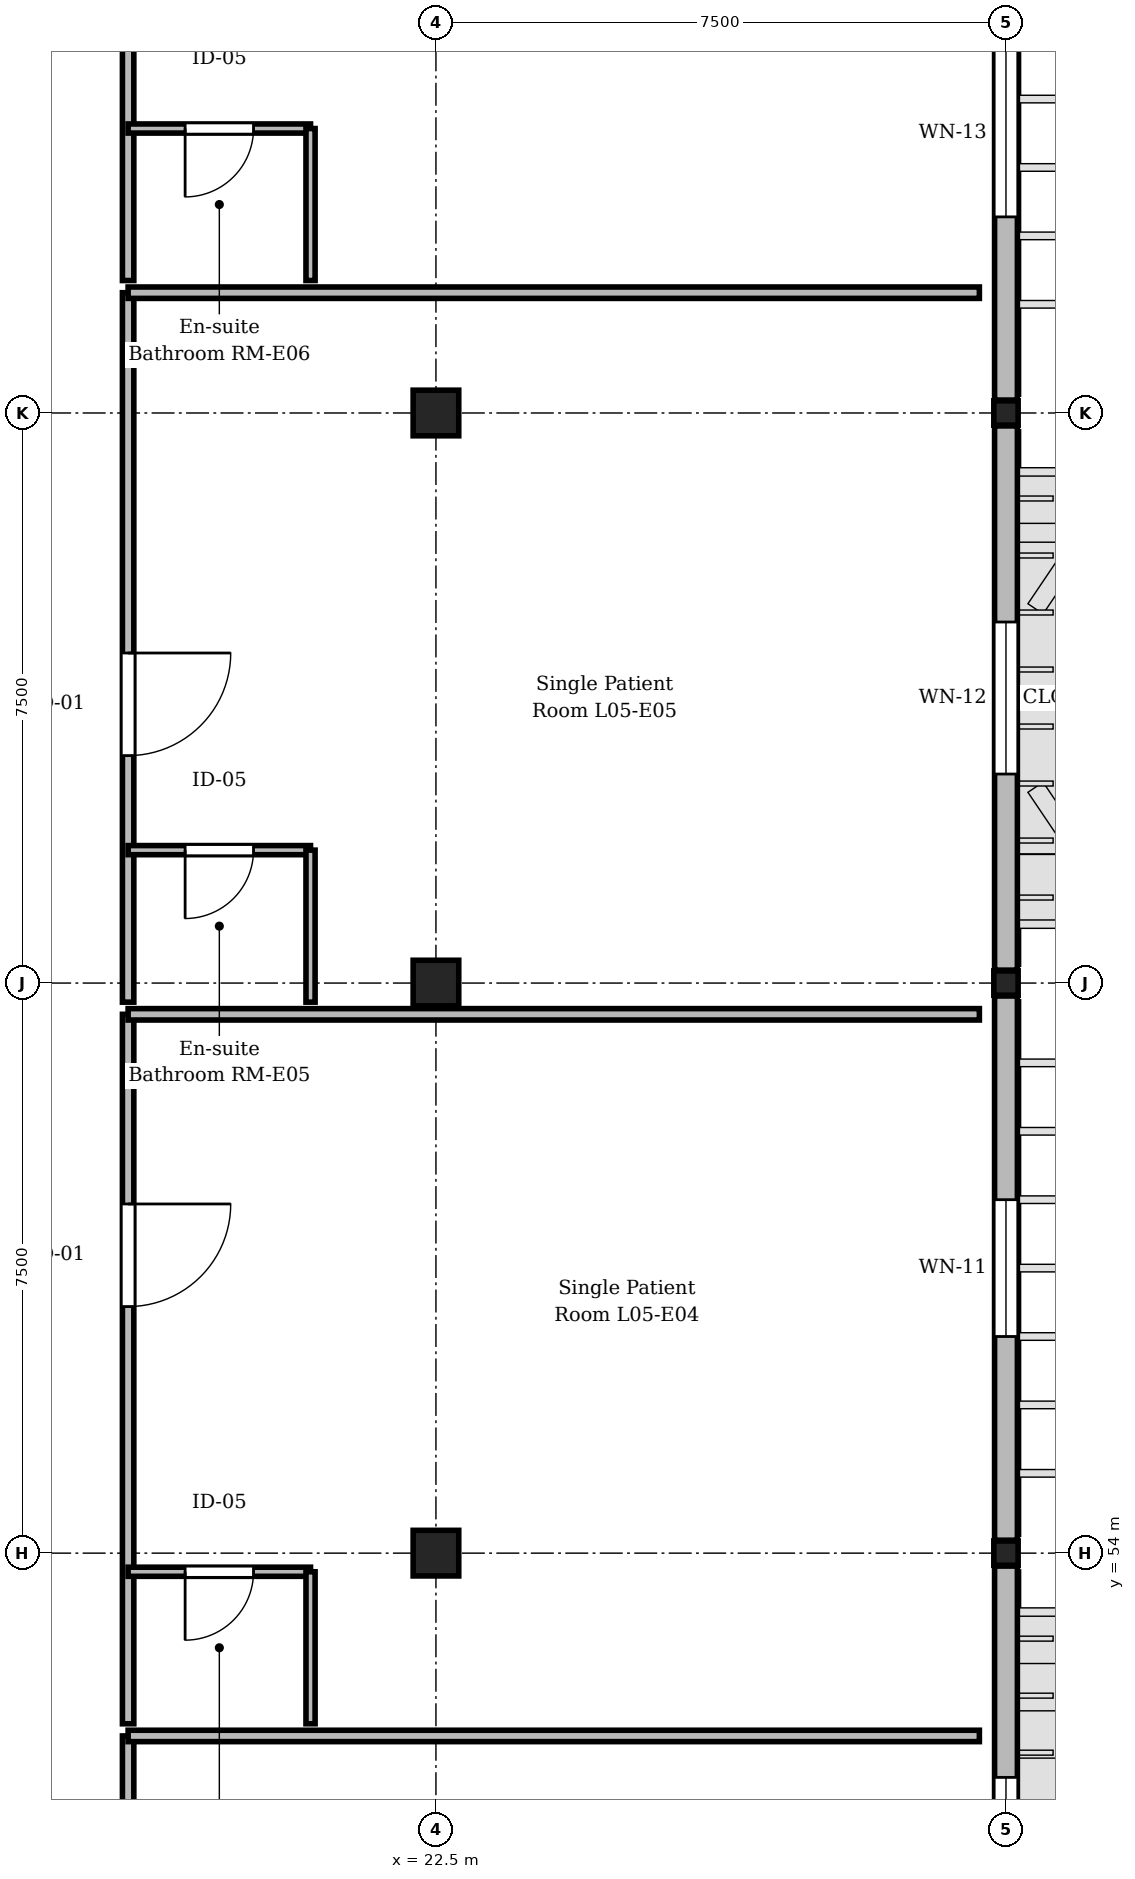
"""IFC4 building model, lengths in metres.
Left out: names, types, materials, properties, quantities, classifications, styles, units other than length and angle.
Written with IfcOpenShell. Run it as: python <this file> out.ifc"""

import sys

from ifc_helpers import new_model, si_unit, direction, frame, frame_2d, origin, origin_2d, place, context, subcontext, project, spatial, rectangle, circle, extrude, element, fill, save


model = new_model("IFC4")
c1 = context("Model", 3, precision=1e-05, world=origin(), true_north=direction((0.0, 1.0)))
c2 = subcontext(c1, "Body", "Model", "MODEL_VIEW")
j1 = project(units=[si_unit("LENGTHUNIT", "METRE"), si_unit("PLANEANGLEUNIT", "RADIAN")], contexts=[c1])
p1 = place(None, origin())
s1 = spatial("IfcSite", under=j1, at=p1, CompositionType="ELEMENT")
p2 = place(p1, origin())
s2 = spatial("IfcBuilding", under=s1, at=p2, CompositionType="ELEMENT")
p3 = place(p2, frame((0.0, 0.0, 21.9)))
s3 = spatial("IfcBuildingStorey", under=s2, at=p3, CompositionType="ELEMENT", Elevation=21.9)
for number, where, z_axis, x_axis in (
    (1, (22.5, 54.0, 0.0), (0.0, 0.0, 1.0), (1.0, 0.0, 0.0)),
    (2, (22.5, 61.5, 0.0), (0.0, 0.0, 1.0), (1.0, 0.0, 0.0)),
):
    element("IfcColumn", number, at=place(p3, frame(where, z_axis=z_axis, x_axis=x_axis)), inside=s3, PredefinedType="COLUMN", context=c2, shape_type="SweptSolid", body=[
        extrude(rectangle(XDim=0.6, YDim=0.6, at=origin_2d()), origin(), (0.0, 0.0, 1.0), 4.05),
    ])
p4 = place(p3, frame((22.5, 69.0, 0.0), z_axis=(0.0, 0.0, 1.0), x_axis=(1.0, 0.0, 0.0)))
e3 = element("IfcColumn", 3, at=p4, inside=s3, PredefinedType="COLUMN", context=c2, shape_type="SweptSolid", body=[
    extrude(circle(Radius=0.3, at=origin_2d()), origin(), (0.0, 0.0, 1.0), 4.05),
])
for number, where, z_axis, x_axis in (
    (4, (30.0, 54.0, 0.0), (0.0, 0.0, 1.0), (1.0, 0.0, 0.0)),
    (5, (30.0, 61.5, 0.0), (0.0, 0.0, 1.0), (1.0, 0.0, 0.0)),
    (6, (30.0, 69.0, 0.0), (0.0, 0.0, 1.0), (1.0, 0.0, 0.0)),
):
    element("IfcColumn", number, at=place(p3, frame(where, z_axis=z_axis, x_axis=x_axis)), inside=s3, PredefinedType="COLUMN", context=c2, shape_type="SweptSolid", body=[
        extrude(rectangle(XDim=0.32, YDim=0.32, at=origin_2d()), origin(), (0.0, 0.0, 1.0), 4.05),
    ])
p5 = place(p3, frame((30.0, 53.83, 0.0), z_axis=(0.0, 0.0, 1.0), x_axis=(0.0, -1.0, 0.0)))
e7 = element("IfcWall", 7, at=p5, inside=s3, PredefinedType="STANDARD", context=c2, shape_type="SweptSolid", body=[
    extrude(rectangle(XDim=7.16, YDim=0.3, at=frame_2d((3.58, 0.0))), origin(), (0.0, 0.0, 1.0), 3.17),
])
p6 = place(p5, frame((2.78, 0.0, 0.9)))
e8 = element("IfcOpeningElement", 8, at=p6, cuts=e7, PredefinedType="OPENING", context=c2, shape_type="SweptSolid", body=[
    extrude(rectangle(XDim=1.6, YDim=1.95, at=frame_2d((0.8, 0.975))), frame((0.0, 0.16, 0.0), z_axis=(0.0, -1.0, 0.0), x_axis=(1.0, 0.0, 0.0)), (0.0, 0.0, 1.0), 0.32),
])
p7 = place(p3, frame((30.0, 61.33, 0.0), z_axis=(0.0, 0.0, 1.0), x_axis=(0.0, -1.0, 0.0)))
e9 = element("IfcWall", 9, at=p7, inside=s3, PredefinedType="STANDARD", context=c2, shape_type="SweptSolid", body=[
    extrude(rectangle(XDim=7.16, YDim=0.3, at=frame_2d((3.58, 0.0))), origin(), (0.0, 0.0, 1.0), 3.17),
])
p8 = place(p7, frame((2.68, 0.0, 0.9)))
e10 = element("IfcOpeningElement", 10, at=p8, cuts=e9, PredefinedType="OPENING", context=c2, shape_type="SweptSolid", body=[
    extrude(rectangle(XDim=1.8, YDim=1.95, at=frame_2d((0.9, 0.975))), frame((0.0, 0.16, 0.0), z_axis=(0.0, -1.0, 0.0), x_axis=(1.0, 0.0, 0.0)), (0.0, 0.0, 1.0), 0.32),
])
p9 = place(p3, frame((30.0, 68.83, 0.0), z_axis=(0.0, 0.0, 1.0), x_axis=(0.0, -1.0, 0.0)))
e11 = element("IfcWall", 11, at=p9, inside=s3, PredefinedType="STANDARD", context=c2, shape_type="SweptSolid", body=[
    extrude(rectangle(XDim=7.16, YDim=0.3, at=frame_2d((3.58, 0.0))), origin(), (0.0, 0.0, 1.0), 3.17),
])
p10 = place(p9, frame((2.58, 0.0, 0.9)))
e12 = element("IfcOpeningElement", 12, at=p10, cuts=e11, PredefinedType="OPENING", context=c2, shape_type="SweptSolid", body=[
    extrude(rectangle(XDim=2.0, YDim=1.95, at=frame_2d((1.0, 0.975))), frame((0.0, 0.16, 0.0), z_axis=(0.0, -1.0, 0.0), x_axis=(1.0, 0.0, 0.0)), (0.0, 0.0, 1.0), 0.32),
])
p11 = place(p3, frame((30.0, 76.19, 0.0), z_axis=(0.0, 0.0, 1.0), x_axis=(0.0, -1.0, 0.0)))
e13 = element("IfcWall", 13, at=p11, inside=s3, PredefinedType="STANDARD", context=c2, shape_type="SweptSolid", body=[
    extrude(rectangle(XDim=7.02, YDim=0.3, at=frame_2d((3.51, 0.0))), origin(), (0.0, 0.0, 1.0), 3.17),
])
p12 = place(p11, frame((2.41, 0.0, 0.9)))
e14 = element("IfcOpeningElement", 14, at=p12, cuts=e13, PredefinedType="OPENING", context=c2, shape_type="SweptSolid", body=[
    extrude(rectangle(XDim=2.2, YDim=1.95, at=frame_2d((1.1, 0.975))), frame((0.0, 0.16, 0.0), z_axis=(0.0, -1.0, 0.0), x_axis=(1.0, 0.0, 0.0)), (0.0, 0.0, 1.0), 0.32),
])
p13 = place(p3, frame((18.45, 51.595, 0.0), z_axis=(0.0, 0.0, 1.0), x_axis=(0.0, -1.0, 0.0)))
e15 = element("IfcWall", 15, at=p13, inside=s3, PredefinedType="PARTITIONING", context=c2, shape_type="SweptSolid", body=[
    extrude(rectangle(XDim=9.334, YDim=0.15, at=frame_2d((4.667, 0.0))), origin(), (0.0, 0.0, 1.0), 3.755),
])
p14 = place(p13, frame((0.998, 0.0, 0.0)))
e16 = element("IfcOpeningElement", 16, at=p14, cuts=e15, PredefinedType="OPENING", context=c2, shape_type="SweptSolid", body=[
    extrude(rectangle(XDim=1.35, YDim=2.25, at=frame_2d((0.675, 1.125))), frame((0.0, 0.085, 0.0), z_axis=(0.0, -1.0, 0.0), x_axis=(1.0, 0.0, 0.0)), (0.0, 0.0, 1.0), 0.17),
])
p15 = place(p3, frame((18.45, 61.089, 0.0), z_axis=(0.0, 0.0, 1.0), x_axis=(0.0, -1.0, 0.0)))
e17 = element("IfcWall", 17, at=p15, inside=s3, PredefinedType="PARTITIONING", context=c2, shape_type="SweptSolid", body=[
    extrude(rectangle(XDim=9.334, YDim=0.15, at=frame_2d((4.667, 0.0))), origin(), (0.0, 0.0, 1.0), 3.755),
])
p16 = place(p15, frame((2.495, 0.0, 0.0)))
e18 = element("IfcOpeningElement", 18, at=p16, cuts=e17, PredefinedType="OPENING", context=c2, shape_type="SweptSolid", body=[
    extrude(rectangle(XDim=1.35, YDim=2.25, at=frame_2d((0.675, 1.125))), frame((0.0, 0.085, 0.0), z_axis=(0.0, -1.0, 0.0), x_axis=(1.0, 0.0, 0.0)), (0.0, 0.0, 1.0), 0.17),
])
p17 = place(p3, frame((20.85, 53.755, 0.0), z_axis=(0.0, 0.0, 1.0), x_axis=(-1.0, 0.0, 0.0)))
e19 = element("IfcWall", 19, at=p17, inside=s3, PredefinedType="PARTITIONING", context=c2, shape_type="SweptSolid", body=[
    extrude(rectangle(XDim=2.4, YDim=0.12, at=frame_2d((1.2, 0.0))), origin(), (0.0, 0.0, 1.0), 3.205),
])
p18 = place(p17, frame((0.75, 0.0, 0.0)))
e20 = element("IfcOpeningElement", 20, at=p18, cuts=e19, PredefinedType="OPENING", context=c2, shape_type="SweptSolid", body=[
    extrude(rectangle(XDim=0.9, YDim=2.1, at=frame_2d((0.45, 1.05))), frame((0.0, 0.07, 0.0), z_axis=(0.0, -1.0, 0.0), x_axis=(1.0, 0.0, 0.0)), (0.0, 0.0, 1.0), 0.14),
])
p19 = place(p3, frame((20.85, 51.755, 0.0), z_axis=(0.0, 0.0, 1.0), x_axis=(0.0, 1.0, 0.0)))
e21 = element("IfcWall", 21, at=p19, inside=s3, PredefinedType="PARTITIONING", context=c2, shape_type="SweptSolid", body=[
    extrude(rectangle(XDim=2.0, YDim=0.12, at=frame_2d((1.0, 0.0))), origin(), (0.0, 0.0, 1.0), 3.755),
])
p20 = place(p3, frame((18.45, 70.583, 0.0), z_axis=(0.0, 0.0, 1.0), x_axis=(0.0, -1.0, 0.0)))
e22 = element("IfcWall", 22, at=p20, inside=s3, PredefinedType="PARTITIONING", context=c2, shape_type="SweptSolid", body=[
    extrude(rectangle(XDim=9.334, YDim=0.15, at=frame_2d((4.667, 0.0))), origin(), (0.0, 0.0, 1.0), 3.755),
])
p21 = place(p20, frame((4.74, 0.0, 0.0)))
e23 = element("IfcOpeningElement", 23, at=p21, cuts=e22, PredefinedType="OPENING", context=c2, shape_type="SweptSolid", body=[
    extrude(rectangle(XDim=1.35, YDim=2.25, at=frame_2d((0.675, 1.125))), frame((0.0, 0.085, 0.0), z_axis=(0.0, -1.0, 0.0), x_axis=(1.0, 0.0, 0.0)), (0.0, 0.0, 1.0), 0.17),
])
p22 = place(p3, frame((20.85, 63.249, 0.0), z_axis=(0.0, 0.0, 1.0), x_axis=(-1.0, 0.0, 0.0)))
e24 = element("IfcWall", 24, at=p22, inside=s3, PredefinedType="PARTITIONING", context=c2, shape_type="SweptSolid", body=[
    extrude(rectangle(XDim=2.4, YDim=0.12, at=frame_2d((1.2, 0.0))), origin(), (0.0, 0.0, 1.0), 3.755),
])
p23 = place(p22, frame((0.75, 0.0, 0.0)))
e25 = element("IfcOpeningElement", 25, at=p23, cuts=e24, PredefinedType="OPENING", context=c2, shape_type="SweptSolid", body=[
    extrude(rectangle(XDim=0.9, YDim=2.1, at=frame_2d((0.45, 1.05))), frame((0.0, 0.07, 0.0), z_axis=(0.0, -1.0, 0.0), x_axis=(1.0, 0.0, 0.0)), (0.0, 0.0, 1.0), 0.14),
])
p24 = place(p3, frame((20.85, 61.249, 0.0), z_axis=(0.0, 0.0, 1.0), x_axis=(0.0, 1.0, 0.0)))
e26 = element("IfcWall", 26, at=p24, inside=s3, PredefinedType="PARTITIONING", context=c2, shape_type="SweptSolid", body=[
    extrude(rectangle(XDim=2.0, YDim=0.12, at=frame_2d((1.0, 0.0))), origin(), (0.0, 0.0, 1.0), 3.755),
])
p25 = place(p3, frame((18.45, 80.076, 0.0), z_axis=(0.0, 0.0, 1.0), x_axis=(0.0, -1.0, 0.0)))
e27 = element("IfcWall", 27, at=p25, inside=s3, PredefinedType="PARTITIONING", context=c2, shape_type="SweptSolid", body=[
    extrude(rectangle(XDim=9.334, YDim=0.15, at=frame_2d((4.667, 0.0))), origin(), (0.0, 0.0, 1.0), 3.355),
])
p26 = place(p25, frame((0.25, 0.0, 0.0)))
e28 = element("IfcOpeningElement", 28, at=p26, cuts=e27, PredefinedType="OPENING", context=c2, shape_type="SweptSolid", body=[
    extrude(rectangle(XDim=1.35, YDim=2.25, at=frame_2d((0.675, 1.125))), frame((0.0, 0.085, 0.0), z_axis=(0.0, -1.0, 0.0), x_axis=(1.0, 0.0, 0.0)), (0.0, 0.0, 1.0), 0.17),
])
p27 = place(p3, frame((20.85, 72.742, 0.0), z_axis=(0.0, 0.0, 1.0), x_axis=(-1.0, 0.0, 0.0)))
e29 = element("IfcWall", 29, at=p27, inside=s3, PredefinedType="PARTITIONING", context=c2, shape_type="SweptSolid", body=[
    extrude(rectangle(XDim=2.4, YDim=0.12, at=frame_2d((1.2, 0.0))), origin(), (0.0, 0.0, 1.0), 3.755),
])
p28 = place(p27, frame((0.75, 0.0, 0.0)))
e30 = element("IfcOpeningElement", 30, at=p28, cuts=e29, PredefinedType="OPENING", context=c2, shape_type="SweptSolid", body=[
    extrude(rectangle(XDim=0.9, YDim=2.1, at=frame_2d((0.45, 1.05))), frame((0.0, 0.07, 0.0), z_axis=(0.0, -1.0, 0.0), x_axis=(1.0, 0.0, 0.0)), (0.0, 0.0, 1.0), 0.14),
])
p29 = place(p3, frame((20.85, 70.742, 0.0), z_axis=(0.0, 0.0, 1.0), x_axis=(0.0, 1.0, 0.0)))
e31 = element("IfcWall", 31, at=p29, inside=s3, PredefinedType="PARTITIONING", context=c2, shape_type="SweptSolid", body=[
    extrude(rectangle(XDim=2.0, YDim=0.12, at=frame_2d((1.0, 0.0))), origin(), (0.0, 0.0, 1.0), 3.755),
])
for number, where, z_axis, x_axis in (
    (32, (18.45, 51.595, 0.0), (0.0, 0.0, 1.0), (1.0, 0.0, 0.0)),
    (33, (18.45, 61.089, 0.0), (0.0, 0.0, 1.0), (1.0, 0.0, 0.0)),
    (34, (18.45, 70.583, 0.0), (0.0, 0.0, 1.0), (1.0, 0.0, 0.0)),
):
    element("IfcWall", number, at=place(p3, frame(where, z_axis=z_axis, x_axis=x_axis)), inside=s3, PredefinedType="PARTITIONING", context=c2, shape_type="SweptSolid", body=[
        extrude(rectangle(XDim=11.2, YDim=0.15, at=frame_2d((5.6, 0.0))), origin(), (0.0, 0.0, 1.0), 3.755),
    ])
p30 = place(p6, origin())
e35 = element("IfcWindow", 35, at=p30, inside=s3, PartitioningType="SINGLE_PANEL", PredefinedType="WINDOW", context=c2, shape_type="SweptSolid", body=[
    extrude(rectangle(XDim=1.6, YDim=1.95, at=frame_2d((0.8, 0.975))), frame((0.0, 0.03, 0.0), z_axis=(0.0, -1.0, 0.0), x_axis=(1.0, 0.0, 0.0)), (0.0, 0.0, 1.0), 0.06),
])
fill(e8, e35)
p31 = place(p8, origin())
e36 = element("IfcWindow", 36, at=p31, inside=s3, PartitioningType="SINGLE_PANEL", PredefinedType="WINDOW", context=c2, shape_type="SweptSolid", body=[
    extrude(rectangle(XDim=1.8, YDim=1.95, at=frame_2d((0.9, 0.975))), frame((0.0, 0.03, 0.0), z_axis=(0.0, -1.0, 0.0), x_axis=(1.0, 0.0, 0.0)), (0.0, 0.0, 1.0), 0.06),
])
fill(e10, e36)
p32 = place(p10, origin())
e37 = element("IfcWindow", 37, at=p32, inside=s3, PartitioningType="SINGLE_PANEL", PredefinedType="WINDOW", context=c2, shape_type="SweptSolid", body=[
    extrude(rectangle(XDim=2.0, YDim=1.95, at=frame_2d((1.0, 0.975))), frame((0.0, 0.03, 0.0), z_axis=(0.0, -1.0, 0.0), x_axis=(1.0, 0.0, 0.0)), (0.0, 0.0, 1.0), 0.06),
])
fill(e12, e37)
p33 = place(p12, origin())
e38 = element("IfcWindow", 38, at=p33, inside=s3, PartitioningType="SINGLE_PANEL", PredefinedType="WINDOW", context=c2, shape_type="SweptSolid", body=[
    extrude(rectangle(XDim=2.2, YDim=1.95, at=frame_2d((1.1, 0.975))), frame((0.0, 0.03, 0.0), z_axis=(0.0, -1.0, 0.0), x_axis=(1.0, 0.0, 0.0)), (0.0, 0.0, 1.0), 0.06),
])
fill(e14, e38)
p34 = place(p16, origin())
e39 = element("IfcDoor", 39, at=p34, inside=s3, OperationType="SINGLE_SWING_LEFT", PredefinedType="DOOR", context=c2, shape_type="SweptSolid", body=[
    extrude(rectangle(XDim=1.35, YDim=2.25, at=frame_2d((0.675, 1.125))), frame((0.0, 0.025, 0.0), z_axis=(0.0, -1.0, 0.0), x_axis=(1.0, 0.0, 0.0)), (0.0, 0.0, 1.0), 0.05),
])
fill(e18, e39)
p35 = place(p18, origin())
e40 = element("IfcDoor", 40, at=p35, inside=s3, OperationType="SINGLE_SWING_RIGHT", PredefinedType="DOOR", context=c2, shape_type="SweptSolid", body=[
    extrude(rectangle(XDim=0.9, YDim=2.1, at=frame_2d((0.45, 1.05))), frame((0.0, 0.025, 0.0), z_axis=(0.0, -1.0, 0.0), x_axis=(1.0, 0.0, 0.0)), (0.0, 0.0, 1.0), 0.05),
])
fill(e20, e40)
p36 = place(p21, origin())
e41 = element("IfcDoor", 41, at=p36, inside=s3, OperationType="SINGLE_SWING_LEFT", PredefinedType="DOOR", context=c2, shape_type="SweptSolid", body=[
    extrude(rectangle(XDim=1.35, YDim=2.25, at=frame_2d((0.675, 1.125))), frame((0.0, 0.025, 0.0), z_axis=(0.0, -1.0, 0.0), x_axis=(1.0, 0.0, 0.0)), (0.0, 0.0, 1.0), 0.05),
])
fill(e23, e41)
p37 = place(p23, origin())
e42 = element("IfcDoor", 42, at=p37, inside=s3, OperationType="SINGLE_SWING_RIGHT", PredefinedType="DOOR", context=c2, shape_type="SweptSolid", body=[
    extrude(rectangle(XDim=0.9, YDim=2.1, at=frame_2d((0.45, 1.05))), frame((0.0, 0.025, 0.0), z_axis=(0.0, -1.0, 0.0), x_axis=(1.0, 0.0, 0.0)), (0.0, 0.0, 1.0), 0.05),
])
fill(e25, e42)
p38 = place(p28, origin())
e43 = element("IfcDoor", 43, at=p38, inside=s3, OperationType="SINGLE_SWING_RIGHT", PredefinedType="DOOR", context=c2, shape_type="SweptSolid", body=[
    extrude(rectangle(XDim=0.9, YDim=2.1, at=frame_2d((0.45, 1.05))), frame((0.0, 0.025, 0.0), z_axis=(0.0, -1.0, 0.0), x_axis=(1.0, 0.0, 0.0)), (0.0, 0.0, 1.0), 0.05),
])
fill(e30, e43)
save(model, sys.argv[1])
